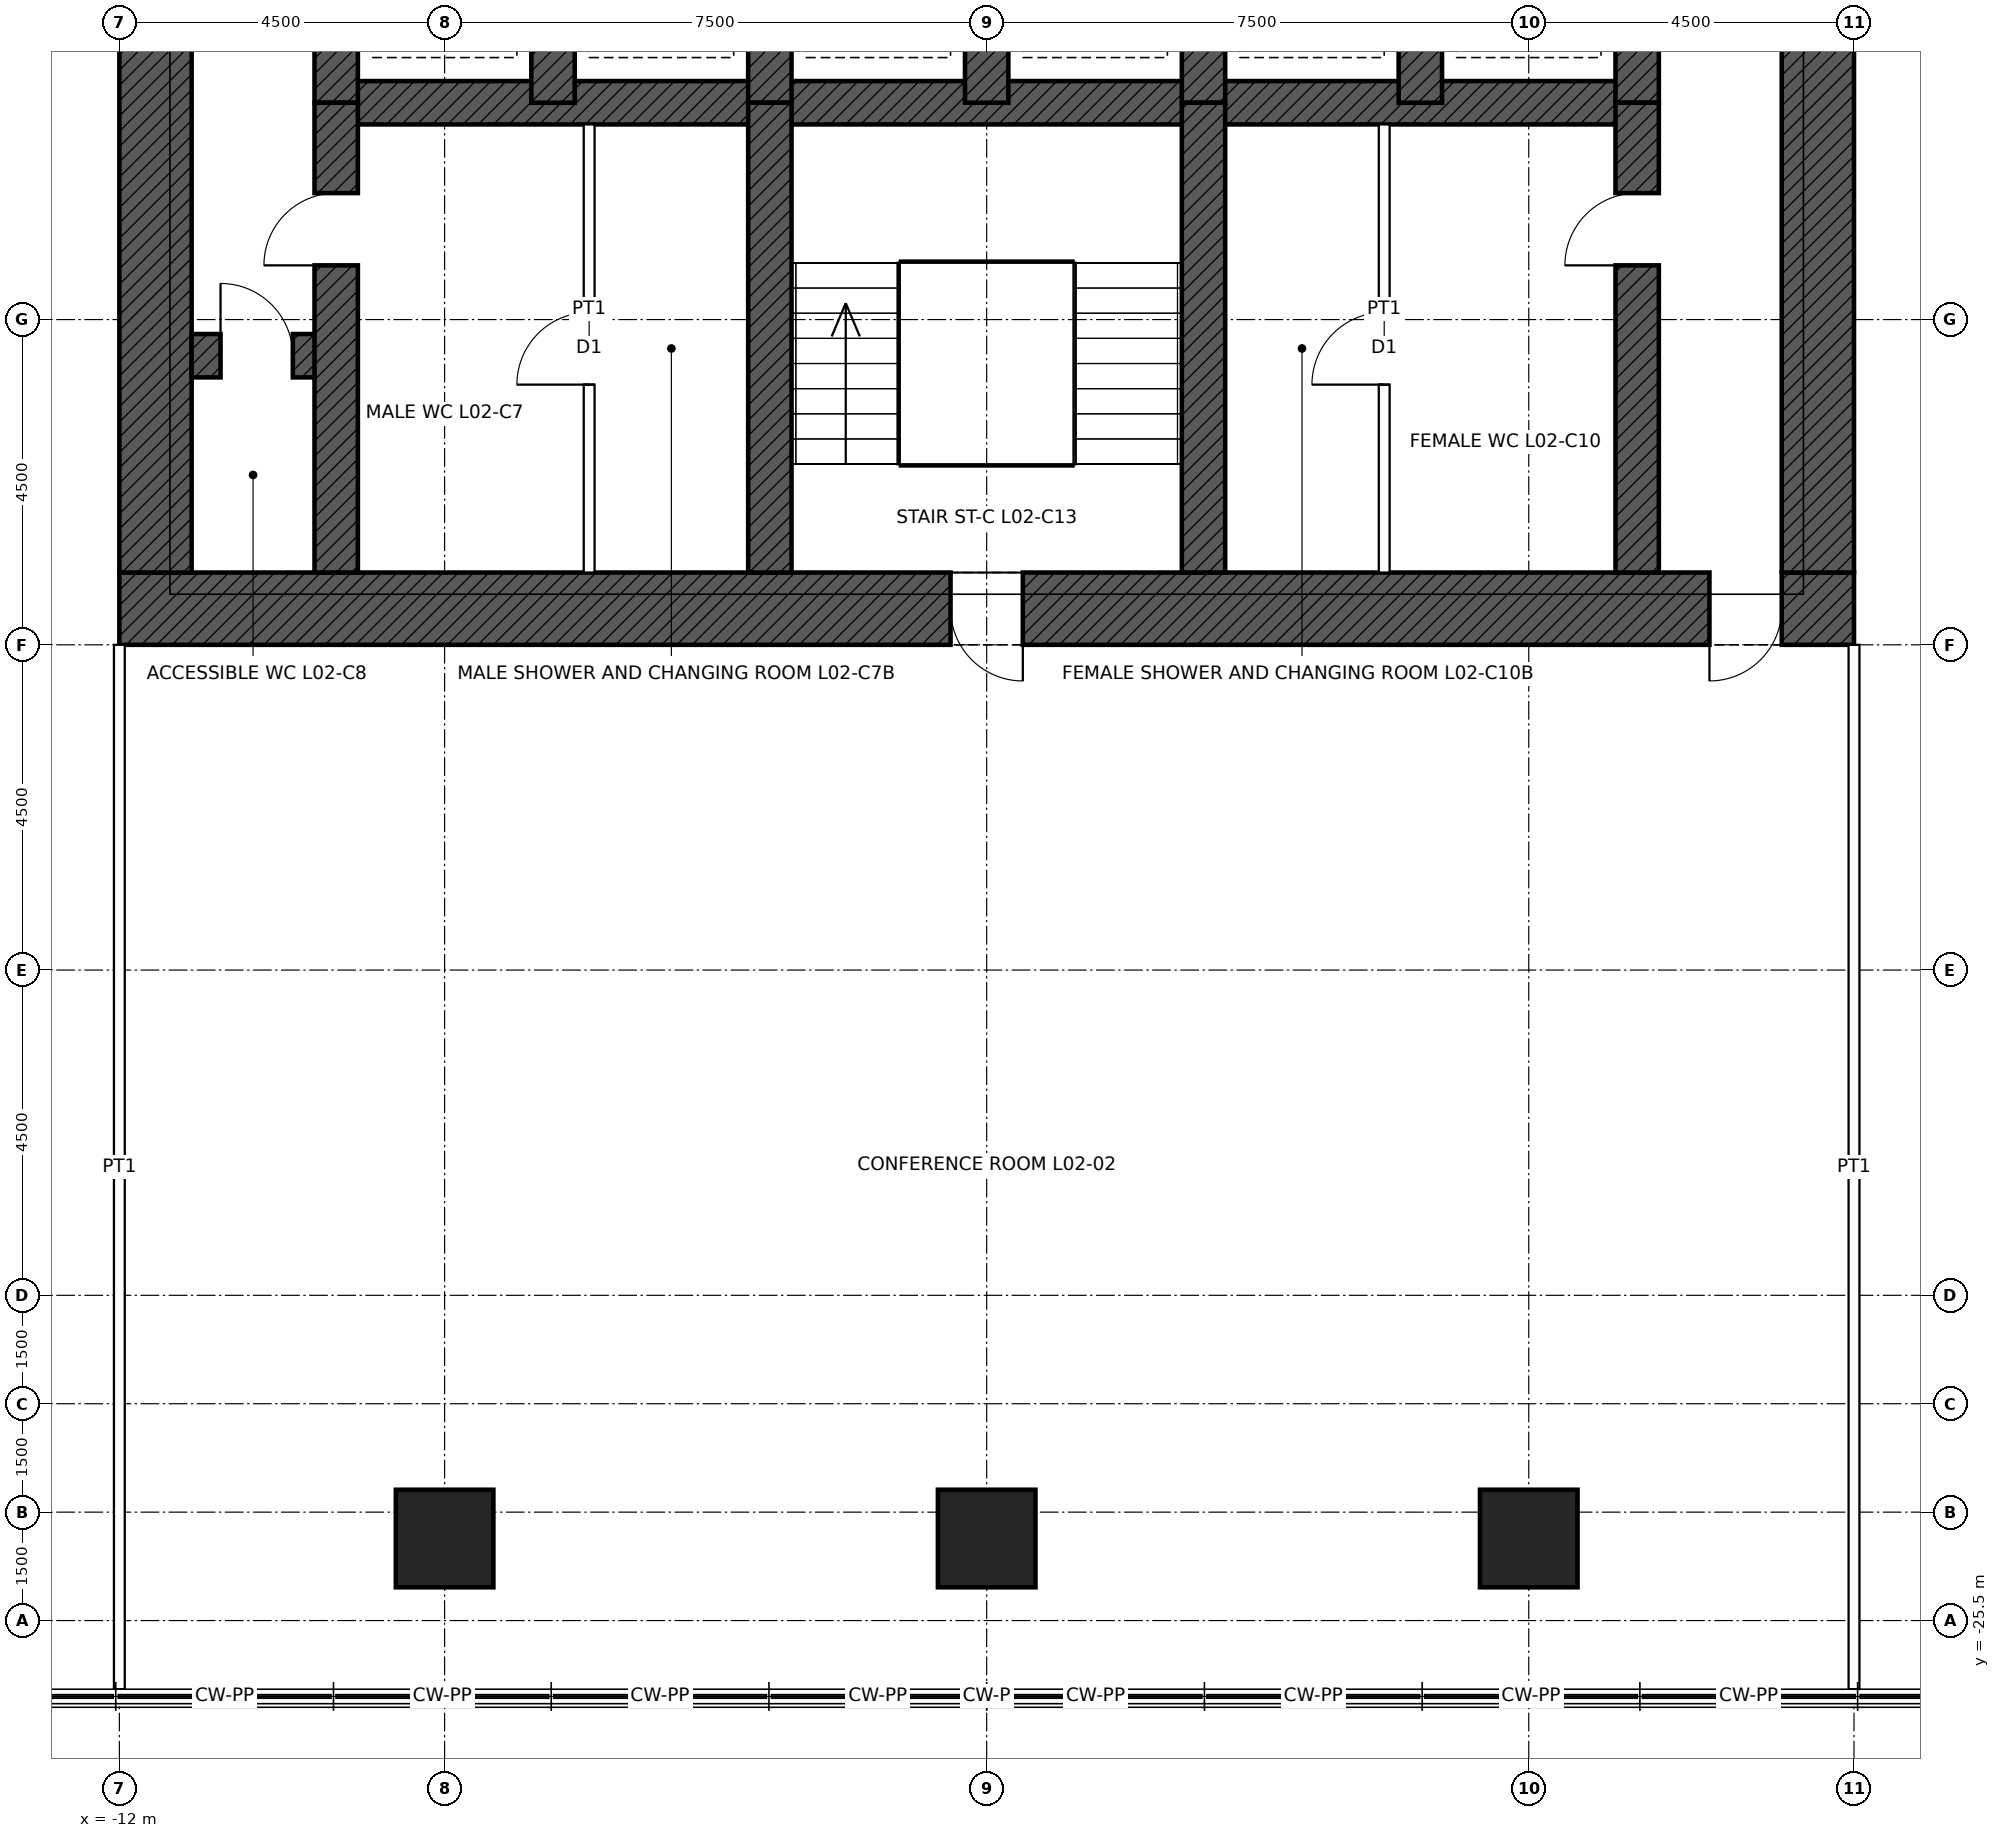
"""IFC4 building model, lengths in metres.
Left out: names, types, materials, properties, quantities, classifications, styles, units other than length and angle.
Written with IfcOpenShell. Run it as: python <this file> out.ifc"""

import sys

from ifc_helpers import new_model, si_unit, direction, frame, frame_2d, origin, origin_2d, place, context, subcontext, project, spatial, rectangle, hollow_rectangle, extrude, element, fill, save


model = new_model("IFC4")
c1 = context("Model", 3, precision=1e-05, world=origin(), true_north=direction((0.0, 1.0)))
c2 = subcontext(c1, "Body", "Model", "MODEL_VIEW")
j1 = project(units=[si_unit("LENGTHUNIT", "METRE"), si_unit("PLANEANGLEUNIT", "RADIAN")], contexts=[c1])
p1 = place(None, origin())
s1 = spatial("IfcSite", under=j1, at=p1, CompositionType="ELEMENT")
p2 = place(p1, origin())
s2 = spatial("IfcBuilding", under=s1, at=p2, CompositionType="ELEMENT")
p3 = place(p2, frame((0.0, 0.0, 12.6)))
s3 = spatial("IfcBuildingStorey", under=s2, at=p3, CompositionType="ELEMENT", Elevation=12.6)
for number, where, z_axis, x_axis in (
    (1, (7.5, -24.365, 0.0), (0.0, 0.0, 1.0), (1.0, 0.0, 0.0)),
    (2, (0.0, -24.365, 0.0), (0.0, 0.0, 1.0), (1.0, 0.0, 0.0)),
    (3, (-7.5, -24.365, 0.0), (0.0, 0.0, 1.0), (1.0, 0.0, 0.0)),
):
    element("IfcColumn", number, at=place(p3, frame(where, z_axis=z_axis, x_axis=x_axis)), inside=s3, PredefinedType="COLUMN", context=c2, shape_type="SweptSolid", body=[
        extrude(hollow_rectangle(XDim=1.35, YDim=1.35, WallThickness=0.1, at=origin_2d()), origin(), (0.0, 0.0, 1.0), 5.4),
    ])
p4 = place(p3, frame((12.0, -11.5, 0.0), z_axis=(0.0, 0.0, 1.0), x_axis=(-1.0, 0.0, 0.0)))
e4 = element("IfcWall", 4, at=p4, inside=s3, PredefinedType="SHEAR", context=c2, shape_type="SweptSolid", body=[
    extrude(rectangle(XDim=24.0, YDim=1.0, at=frame_2d((12.0, 0.0))), origin(), (0.0, 0.0, 1.0), 5.4),
])
p5 = place(p4, frame((11.5, 0.0, 0.0)))
e5 = element("IfcOpeningElement", 5, at=p5, cuts=e4, PredefinedType="OPENING", context=c2, shape_type="SweptSolid", body=[
    extrude(rectangle(XDim=1.0, YDim=2.1, at=frame_2d((0.5, 1.05))), frame((0.0, 0.51, 0.0), z_axis=(0.0, -1.0, 0.0), x_axis=(1.0, 0.0, 0.0)), (0.0, 0.0, 1.0), 1.02),
])
p6 = place(p4, frame((1.0, 0.0, 0.0)))
e6 = element("IfcOpeningElement", 6, at=p6, cuts=e4, PredefinedType="OPENING", context=c2, shape_type="SweptSolid", body=[
    extrude(rectangle(XDim=1.0, YDim=2.4, at=frame_2d((0.5, 1.2))), frame((0.0, 0.51, 0.0), z_axis=(0.0, -1.0, 0.0), x_axis=(1.0, 0.0, 0.0)), (0.0, 0.0, 1.0), 1.02),
])
p7 = place(p3, frame((11.5, 11.0, 0.0), z_axis=(0.0, 0.0, 1.0), x_axis=(0.0, -1.0, 0.0)))
e7 = element("IfcWall", 7, at=p7, inside=s3, PredefinedType="SHEAR", context=c2, shape_type="SweptSolid", body=[
    extrude(rectangle(XDim=22.0, YDim=1.0, at=frame_2d((11.0, 0.0))), origin(), (0.0, 0.0, 1.0), 5.4),
])
p8 = place(p7, frame((10.5, 0.0, 0.0)))
e8 = element("IfcOpeningElement", 8, at=p8, cuts=e7, PredefinedType="OPENING", context=c2, shape_type="SweptSolid", body=[
    extrude(rectangle(XDim=1.0, YDim=2.4, at=frame_2d((0.5, 1.2))), frame((0.0, 0.51, 0.0), z_axis=(0.0, -1.0, 0.0), x_axis=(1.0, 0.0, 0.0)), (0.0, 0.0, 1.0), 1.02),
])
p9 = place(p3, frame((-11.5, -11.0, 0.0), z_axis=(0.0, 0.0, 1.0), x_axis=(0.0, 1.0, 0.0)))
e9 = element("IfcWall", 9, at=p9, inside=s3, PredefinedType="SHEAR", context=c2, shape_type="SweptSolid", body=[
    extrude(rectangle(XDim=22.0, YDim=1.0, at=frame_2d((11.0, 0.0))), origin(), (0.0, 0.0, 1.0), 5.4),
])
p10 = place(p9, frame((10.5, 0.0, 0.0)))
e10 = element("IfcOpeningElement", 10, at=p10, cuts=e9, PredefinedType="OPENING", context=c2, shape_type="SweptSolid", body=[
    extrude(rectangle(XDim=1.0, YDim=2.4, at=frame_2d((0.5, 1.2))), frame((0.0, 0.51, 0.0), z_axis=(0.0, -1.0, 0.0), x_axis=(1.0, 0.0, 0.0)), (0.0, 0.0, 1.0), 1.02),
])
p11 = place(p3, frame((-9.0, -4.5, 0.0), z_axis=(0.0, 0.0, 1.0), x_axis=(1.0, 0.0, 0.0)))
e11 = element("IfcWall", 11, at=p11, inside=s3, PredefinedType="SHEAR", context=c2, shape_type="SweptSolid", body=[
    extrude(rectangle(XDim=18.0, YDim=0.6, at=frame_2d((9.0, 0.0))), origin(), (0.0, 0.0, 1.0), 5.4),
])
p12 = place(p3, frame((-11.0, -8.0, 0.0), z_axis=(0.0, 0.0, 1.0), x_axis=(1.0, 0.0, 0.0)))
e12 = element("IfcWall", 12, at=p12, inside=s3, PredefinedType="SHEAR", context=c2, shape_type="SweptSolid", body=[
    extrude(rectangle(XDim=2.0, YDim=0.6, at=frame_2d((1.0, 0.0))), origin(), (0.0, 0.0, 1.0), 5.4),
])
p13 = place(p12, frame((0.4, 0.0, 0.0)))
e13 = element("IfcOpeningElement", 13, at=p13, cuts=e12, PredefinedType="OPENING", context=c2, shape_type="SweptSolid", body=[
    extrude(rectangle(XDim=1.0, YDim=2.1, at=frame_2d((0.5, 1.05))), frame((0.0, 0.31, 0.0), z_axis=(0.0, -1.0, 0.0), x_axis=(1.0, 0.0, 0.0)), (0.0, 0.0, 1.0), 0.62),
])
for number, where, z_axis, x_axis in (
    (14, (-9.0, -4.5, 0.0), (0.0, 0.0, 1.0), (0.0, 1.0, 0.0)),
    (15, (9.0, -4.5, 0.0), (0.0, 0.0, 1.0), (0.0, 1.0, 0.0)),
    (16, (-6.0, -4.5, 0.0), (0.0, 0.0, 1.0), (0.0, 1.0, 0.0)),
    (17, (-3.0, -4.5, 0.0), (0.0, 0.0, 1.0), (0.0, 1.0, 0.0)),
    (18, (0.0, -4.5, 0.0), (0.0, 0.0, 1.0), (0.0, 1.0, 0.0)),
    (19, (3.0, -4.5, 0.0), (0.0, 0.0, 1.0), (0.0, 1.0, 0.0)),
    (20, (6.0, -4.5, 0.0), (0.0, 0.0, 1.0), (0.0, 1.0, 0.0)),
):
    element("IfcWall", number, at=place(p3, frame(where, z_axis=z_axis, x_axis=x_axis)), inside=s3, PredefinedType="SHEAR", context=c2, shape_type="SweptSolid", body=[
        extrude(rectangle(XDim=3.0, YDim=0.6, at=frame_2d((1.5, 0.0))), origin(), (0.0, 0.0, 1.0), 5.4),
    ])
p14 = place(p3, frame((-9.0, -11.0, 0.0), z_axis=(0.0, 0.0, 1.0), x_axis=(0.0, 1.0, 0.0)))
e21 = element("IfcWall", 21, at=p14, inside=s3, PredefinedType="SHEAR", context=c2, shape_type="SweptSolid", body=[
    extrude(rectangle(XDim=6.5, YDim=0.6, at=frame_2d((3.25, 0.0))), origin(), (0.0, 0.0, 1.0), 5.4),
])
p15 = place(p14, frame((4.25, 0.0, 0.0)))
e22 = element("IfcOpeningElement", 22, at=p15, cuts=e21, PredefinedType="OPENING", context=c2, shape_type="SweptSolid", body=[
    extrude(rectangle(XDim=1.0, YDim=2.1, at=frame_2d((0.5, 1.05))), frame((0.0, 0.31, 0.0), z_axis=(0.0, -1.0, 0.0), x_axis=(1.0, 0.0, 0.0)), (0.0, 0.0, 1.0), 0.62),
])
p16 = place(p3, frame((9.0, -11.0, 0.0), z_axis=(0.0, 0.0, 1.0), x_axis=(0.0, 1.0, 0.0)))
e23 = element("IfcWall", 23, at=p16, inside=s3, PredefinedType="SHEAR", context=c2, shape_type="SweptSolid", body=[
    extrude(rectangle(XDim=6.5, YDim=0.6, at=frame_2d((3.25, 0.0))), origin(), (0.0, 0.0, 1.0), 5.4),
])
p17 = place(p16, frame((4.25, 0.0, 0.0)))
e24 = element("IfcOpeningElement", 24, at=p17, cuts=e23, PredefinedType="OPENING", context=c2, shape_type="SweptSolid", body=[
    extrude(rectangle(XDim=1.0, YDim=2.1, at=frame_2d((0.5, 1.05))), frame((0.0, 0.31, 0.0), z_axis=(0.0, -1.0, 0.0), x_axis=(1.0, 0.0, 0.0)), (0.0, 0.0, 1.0), 0.62),
])
for number, where, z_axis, x_axis in (
    (25, (-3.0, -11.0, 0.0), (0.0, 0.0, 1.0), (0.0, 1.0, 0.0)),
    (26, (3.0, -11.0, 0.0), (0.0, 0.0, 1.0), (0.0, 1.0, 0.0)),
):
    element("IfcWall", number, at=place(p3, frame(where, z_axis=z_axis, x_axis=x_axis)), inside=s3, PredefinedType="SHEAR", context=c2, shape_type="SweptSolid", body=[
        extrude(rectangle(XDim=6.5, YDim=0.6, at=frame_2d((3.25, 0.0))), origin(), (0.0, 0.0, 1.0), 5.4),
    ])
p18 = place(p3, frame((-12.0, -12.0, 0.0), z_axis=(0.0, 0.0, 1.0), x_axis=(0.0, -1.0, 0.0)))
e27 = element("IfcWall", 27, at=p18, inside=s3, PredefinedType="PARTITIONING", context=c2, shape_type="SweptSolid", body=[
    extrude(rectangle(XDim=14.45, YDim=0.15, at=frame_2d((7.225, 0.0))), origin(), (0.0, 0.0, 1.0), 5.15),
])
p19 = place(p3, frame((12.0, -12.0, 0.0), z_axis=(0.0, 0.0, 1.0), x_axis=(0.0, -1.0, 0.0)))
e28 = element("IfcWall", 28, at=p19, inside=s3, PredefinedType="PARTITIONING", context=c2, shape_type="SweptSolid", body=[
    extrude(rectangle(XDim=14.45, YDim=0.15, at=frame_2d((7.225, 0.0))), origin(), (0.0, 0.0, 1.0), 4.108),
])
p20 = place(p3, frame((-5.5, -11.0, 0.0), z_axis=(0.0, 0.0, 1.0), x_axis=(0.0, 1.0, 0.0)))
e29 = element("IfcWall", 29, at=p20, inside=s3, PredefinedType="PARTITIONING", context=c2, shape_type="SweptSolid", body=[
    extrude(rectangle(XDim=6.2, YDim=0.15, at=frame_2d((3.1, 0.0))), origin(), (0.0, 0.0, 1.0), 5.15),
])
p21 = place(p20, frame((2.6, 0.0, 0.0)))
e30 = element("IfcOpeningElement", 30, at=p21, cuts=e29, PredefinedType="OPENING", context=c2, shape_type="SweptSolid", body=[
    extrude(rectangle(XDim=1.0, YDim=2.1, at=frame_2d((0.5, 1.05))), frame((0.0, 0.085, 0.0), z_axis=(0.0, -1.0, 0.0), x_axis=(1.0, 0.0, 0.0)), (0.0, 0.0, 1.0), 0.17),
])
p22 = place(p3, frame((5.5, -11.0, 0.0), z_axis=(0.0, 0.0, 1.0), x_axis=(0.0, 1.0, 0.0)))
e31 = element("IfcWall", 31, at=p22, inside=s3, PredefinedType="PARTITIONING", context=c2, shape_type="SweptSolid", body=[
    extrude(rectangle(XDim=6.2, YDim=0.15, at=frame_2d((3.1, 0.0))), origin(), (0.0, 0.0, 1.0), 5.15),
])
p23 = place(p22, frame((2.6, 0.0, 0.0)))
e32 = element("IfcOpeningElement", 32, at=p23, cuts=e31, PredefinedType="OPENING", context=c2, shape_type="SweptSolid", body=[
    extrude(rectangle(XDim=1.0, YDim=2.1, at=frame_2d((0.5, 1.05))), frame((0.0, 0.085, 0.0), z_axis=(0.0, -1.0, 0.0), x_axis=(1.0, 0.0, 0.0)), (0.0, 0.0, 1.0), 0.17),
])
p24 = place(p5, origin())
e33 = element("IfcDoor", 33, at=p24, inside=s3, OperationType="SINGLE_SWING_LEFT", PredefinedType="DOOR", context=c2, shape_type="SweptSolid", body=[
    extrude(rectangle(XDim=1.0, YDim=2.1, at=frame_2d((0.5, 1.05))), frame((0.0, 0.485, 0.0), z_axis=(0.0, -1.0, 0.0), x_axis=(1.0, 0.0, 0.0)), (0.0, 0.0, 1.0), 0.05),
])
fill(e5, e33)
p25 = place(p6, origin())
e34 = element("IfcDoor", 34, at=p25, inside=s3, OperationType="SINGLE_SWING_RIGHT", PredefinedType="DOOR", context=c2, shape_type="SweptSolid", body=[
    extrude(rectangle(XDim=1.0, YDim=2.4, at=frame_2d((0.5, 1.2))), frame((0.0, 0.485, 0.0), z_axis=(0.0, -1.0, 0.0), x_axis=(1.0, 0.0, 0.0)), (0.0, 0.0, 1.0), 0.05),
])
fill(e6, e34)
p26 = place(p15, origin())
e35 = element("IfcDoor", 35, at=p26, inside=s3, OperationType="SINGLE_SWING_LEFT", PredefinedType="DOOR", context=c2, shape_type="SweptSolid", body=[
    extrude(rectangle(XDim=1.0, YDim=2.1, at=frame_2d((0.5, 1.05))), frame((0.0, 0.025, 0.0), z_axis=(0.0, -1.0, 0.0), x_axis=(1.0, 0.0, 0.0)), (0.0, 0.0, 1.0), 0.05),
])
fill(e22, e35)
p27 = place(p17, origin())
e36 = element("IfcDoor", 36, at=p27, inside=s3, OperationType="SINGLE_SWING_LEFT", PredefinedType="DOOR", context=c2, shape_type="SweptSolid", body=[
    extrude(rectangle(XDim=1.0, YDim=2.1, at=frame_2d((0.5, 1.05))), frame((0.0, 0.025, 0.0), z_axis=(0.0, -1.0, 0.0), x_axis=(1.0, 0.0, 0.0)), (0.0, 0.0, 1.0), 0.05),
])
fill(e24, e36)
p28 = place(p13, origin())
e37 = element("IfcDoor", 37, at=p28, inside=s3, OperationType="SINGLE_SWING_LEFT", PredefinedType="DOOR", context=c2, shape_type="SweptSolid", body=[
    extrude(rectangle(XDim=1.0, YDim=2.1, at=frame_2d((0.5, 1.05))), frame((0.0, 0.025, 0.0), z_axis=(0.0, -1.0, 0.0), x_axis=(1.0, 0.0, 0.0)), (0.0, 0.0, 1.0), 0.05),
])
fill(e13, e37)
p29 = place(p21, origin())
e38 = element("IfcDoor", 38, at=p29, inside=s3, OperationType="SINGLE_SWING_LEFT", PredefinedType="DOOR", context=c2, shape_type="SweptSolid", body=[
    extrude(rectangle(XDim=1.0, YDim=2.1, at=frame_2d((0.5, 1.05))), frame((0.0, 0.025, 0.0), z_axis=(0.0, -1.0, 0.0), x_axis=(1.0, 0.0, 0.0)), (0.0, 0.0, 1.0), 0.05),
])
fill(e30, e38)
p30 = place(p23, origin())
e39 = element("IfcDoor", 39, at=p30, inside=s3, OperationType="SINGLE_SWING_LEFT", PredefinedType="DOOR", context=c2, shape_type="SweptSolid", body=[
    extrude(rectangle(XDim=1.0, YDim=2.1, at=frame_2d((0.5, 1.05))), frame((0.0, 0.025, 0.0), z_axis=(0.0, -1.0, 0.0), x_axis=(1.0, 0.0, 0.0)), (0.0, 0.0, 1.0), 0.05),
])
fill(e32, e39)
save(model, sys.argv[1])
